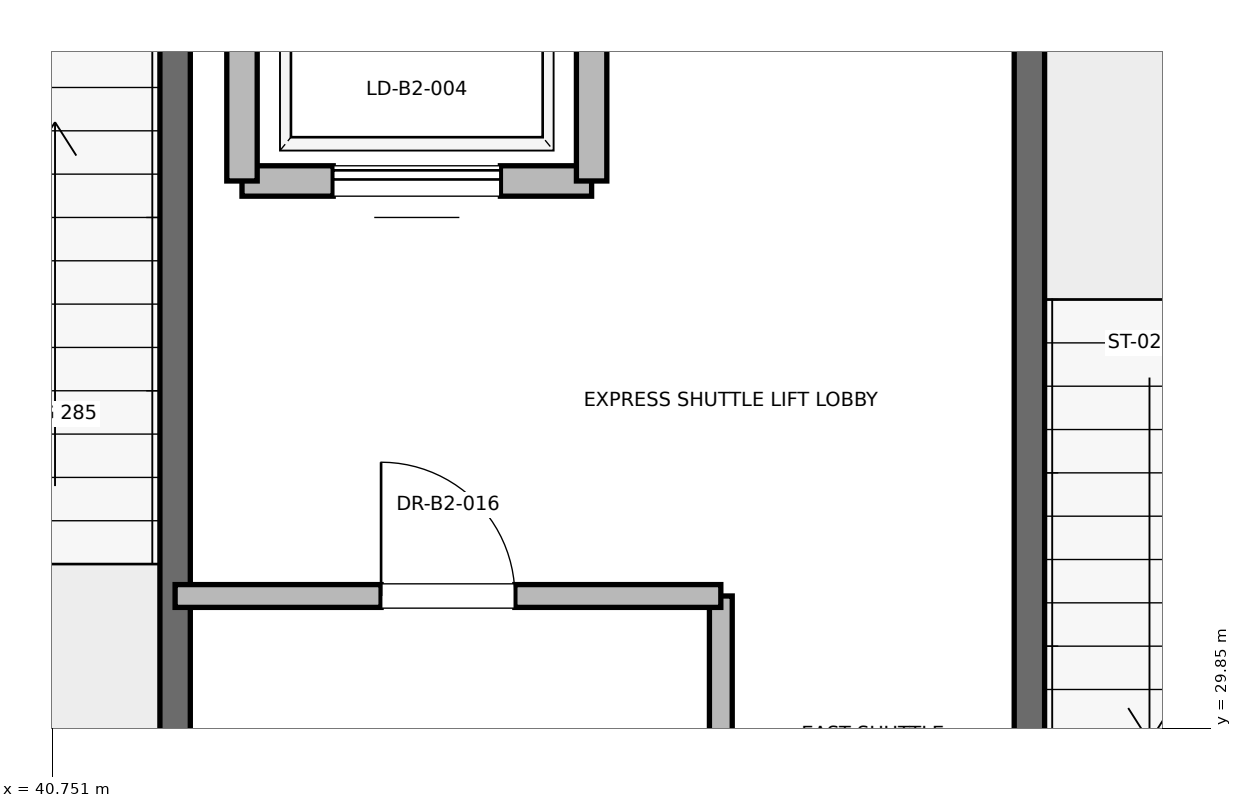
"""IFC4 building model, lengths in metres.
Left out: names, types, materials, properties, quantities, classifications, styles, units other than length and angle.
Written with IfcOpenShell. Run it as: python <this file> out.ifc"""

import sys

from ifc_helpers import new_model, si_unit, direction, frame, frame_2d, origin, place, context, subcontext, project, spatial, rectangle, extrude, element, fill, save


model = new_model("IFC4")
c1 = context("Model", 3, precision=1e-05, world=origin(), true_north=direction((0.0, 1.0)))
c2 = subcontext(c1, "Body", "Model", "MODEL_VIEW")
j1 = project(units=[si_unit("LENGTHUNIT", "METRE"), si_unit("PLANEANGLEUNIT", "RADIAN")], contexts=[c1])
p1 = place(None, origin())
s1 = spatial("IfcSite", under=j1, at=p1, CompositionType="ELEMENT")
p2 = place(p1, origin())
s2 = spatial("IfcBuilding", under=s1, at=p2, CompositionType="ELEMENT")
p3 = place(p2, frame((0.0, 0.0, -9.0)))
s3 = spatial("IfcBuildingStorey", under=s2, at=p3, CompositionType="ELEMENT", Elevation=-9.0)
p4 = place(p3, frame((47.18, 27.62, -0.3), z_axis=(0.0, 0.0, 1.0), x_axis=(0.0, 1.0, 0.0)))
e1 = element("IfcWall", 1, at=p4, inside=s3, PredefinedType="SOLIDWALL", context=c2, shape_type="SweptSolid", body=[
    extrude(rectangle(XDim=8.18, YDim=0.2, at=frame_2d((4.09, 0.0))), origin(), (0.0, 0.0, 1.0), 4.5),
])
p5 = place(p3, frame((41.56, 27.68, -0.3), z_axis=(0.0, 0.0, 1.0), x_axis=(0.0, 1.0, 0.0)))
e2 = element("IfcWall", 2, at=p5, inside=s3, PredefinedType="SOLIDWALL", context=c2, shape_type="SweptSolid", body=[
    extrude(rectangle(XDim=8.57, YDim=0.2, at=frame_2d((4.285, 0.0))), origin(), (0.0, 0.0, 1.0), 4.5),
])
p6 = place(p3, frame((42.0, 33.45, 0.0), z_axis=(0.0, 0.0, 1.0), x_axis=(1.0, 0.0, 0.0)))
e3 = element("IfcWall", 3, at=p6, inside=s3, PredefinedType="SOLIDWALL", context=c2, shape_type="SweptSolid", body=[
    extrude(rectangle(XDim=2.3, YDim=0.2, at=frame_2d((1.15, 0.0))), origin(), (0.0, 0.0, 1.0), 4.2),
])
p7 = place(p6, frame((0.6, 0.0, 0.0)))
e4 = element("IfcOpeningElement", 4, at=p7, cuts=e3, PredefinedType="OPENING", context=c2, shape_type="SweptSolid", body=[
    extrude(rectangle(XDim=1.1, YDim=2.2, at=frame_2d((0.55, 1.1))), frame((0.0, 0.1, 0.0), z_axis=(0.0, -1.0, 0.0), x_axis=(1.0, 0.0, 0.0)), (0.0, 0.0, 1.0), 0.2),
])
for number, where, z_axis, x_axis in (
    (5, (42.0, 36.05, 0.0), (0.0, 0.0, 1.0), (0.0, -1.0, 0.0)),
    (6, (44.3, 33.45, 0.0), (0.0, 0.0, 1.0), (0.0, 1.0, 0.0)),
):
    element("IfcWall", number, at=place(p3, frame(where, z_axis=z_axis, x_axis=x_axis)), inside=s3, PredefinedType="SOLIDWALL", context=c2, shape_type="SweptSolid", body=[
        extrude(rectangle(XDim=2.6, YDim=0.2, at=frame_2d((1.3, 0.0))), origin(), (0.0, 0.0, 1.0), 2.98),
    ])
p8 = place(p3, frame((45.15, 27.62, 0.0), z_axis=(0.0, 0.0, 1.0), x_axis=(0.0, 1.0, 0.0)))
e7 = element("IfcWall", 7, at=p8, inside=s3, PredefinedType="PARTITIONING", context=c2, shape_type="SweptSolid", body=[
    extrude(rectangle(XDim=3.1, YDim=0.15, at=frame_2d((1.55, 0.0))), origin(), (0.0, 0.0, 1.0), 2.85),
])
p9 = place(p3, frame((41.56, 30.72, 0.0), z_axis=(0.0, 0.0, 1.0), x_axis=(1.0, 0.0, 0.0)))
e8 = element("IfcWall", 8, at=p9, inside=s3, PredefinedType="PARTITIONING", context=c2, shape_type="SweptSolid", body=[
    extrude(rectangle(XDim=3.59, YDim=0.15, at=frame_2d((1.795, 0.0))), origin(), (0.0, 0.0, 1.0), 2.85),
])
p10 = place(p9, frame((1.355, 0.0, 0.0)))
e9 = element("IfcOpeningElement", 9, at=p10, cuts=e8, PredefinedType="OPENING", context=c2, shape_type="SweptSolid", body=[
    extrude(rectangle(XDim=0.88, YDim=2.1, at=frame_2d((0.44, 1.05))), frame((0.0, 0.075, 0.0), z_axis=(0.0, -1.0, 0.0), x_axis=(1.0, 0.0, 0.0)), (0.0, 0.0, 1.0), 0.15),
])
p11 = place(p7, origin())
e10 = element("IfcDoor", 10, at=p11, inside=s3, OperationType="SLIDING_TO_RIGHT", PredefinedType="DOOR", context=c2, shape_type="SweptSolid", body=[
    extrude(rectangle(XDim=1.1, YDim=2.2, at=frame_2d((0.55, 1.1))), frame((0.0, 0.025, 0.0), z_axis=(0.0, -1.0, 0.0), x_axis=(1.0, 0.0, 0.0)), (0.0, 0.0, 1.0), 0.05),
])
fill(e4, e10)
p12 = place(p10, origin())
e11 = element("IfcDoor", 11, at=p12, inside=s3, OperationType="SINGLE_SWING_LEFT", PredefinedType="DOOR", context=c2, shape_type="SweptSolid", body=[
    extrude(rectangle(XDim=0.88, YDim=2.1, at=frame_2d((0.44, 1.05))), frame((0.0, 0.025, 0.0), z_axis=(0.0, -1.0, 0.0), x_axis=(1.0, 0.0, 0.0)), (0.0, 0.0, 1.0), 0.05),
])
fill(e9, e11)
save(model, sys.argv[1])
